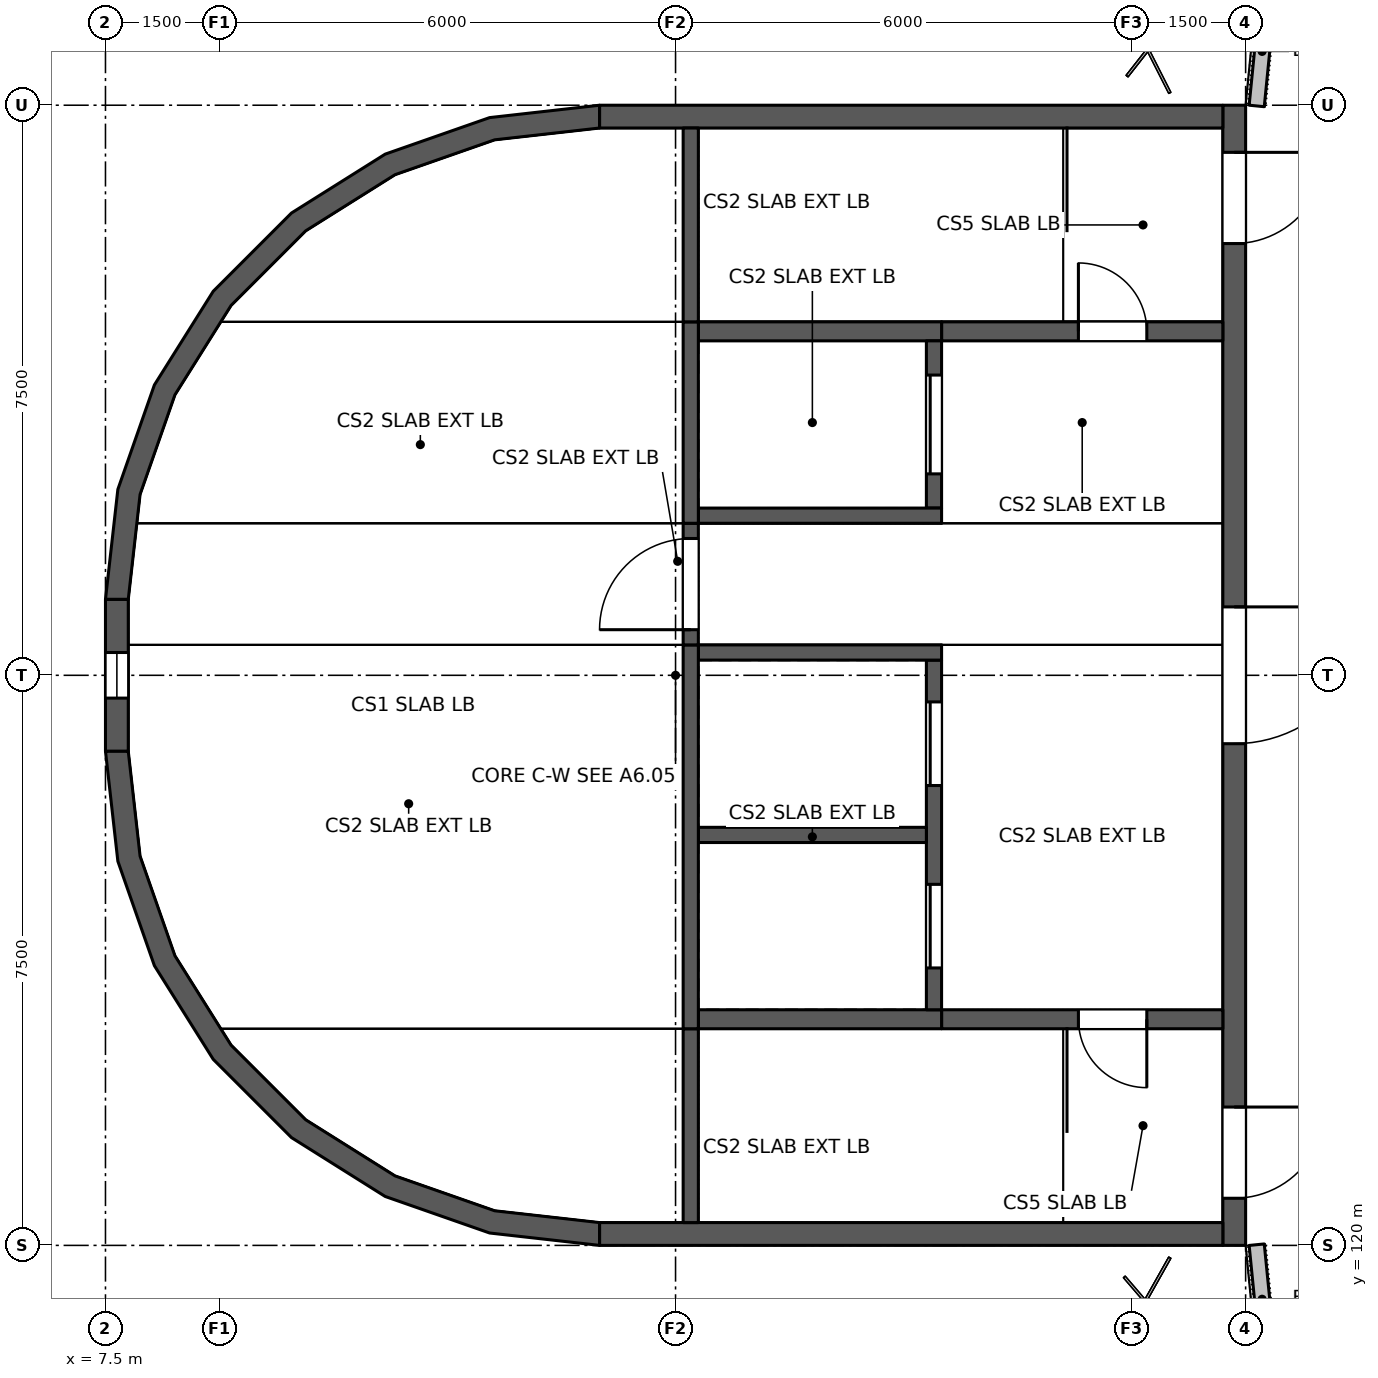
"""IFC4 building model, lengths in metres.
Left out: names, types, materials, properties, quantities, classifications, styles, units other than length and angle.
Written with IfcOpenShell. Run it as: python <this file> out.ifc"""

import sys

from ifc_helpers import new_model, si_unit, direction, frame, frame_2d, origin, place, context, subcontext, project, spatial, polyline, rectangle, outline, extrude, element, fill, save


model = new_model("IFC4")
c1 = context("Model", 3, precision=1e-05, world=origin(), true_north=direction((0.0, 1.0)))
c2 = subcontext(c1, "Body", "Model", "MODEL_VIEW")
j1 = project(units=[si_unit("LENGTHUNIT", "METRE"), si_unit("PLANEANGLEUNIT", "RADIAN")], contexts=[c1])
p1 = place(None, origin())
s1 = spatial("IfcSite", under=j1, at=p1, CompositionType="ELEMENT")
p2 = place(p1, origin())
s2 = spatial("IfcBuilding", under=s1, at=p2, CompositionType="ELEMENT")
p3 = place(p2, frame((0.0, 0.0, 13.2)))
s3 = spatial("IfcBuildingStorey", under=s2, at=p3, CompositionType="ELEMENT", Elevation=13.2)
p4 = place(p3, frame((22.788, 136.426, 0.0), z_axis=(0.0, 0.0, 1.0), x_axis=(-0.098665870876, -0.995120618782, 0.0)))
e1 = element("IfcWall", 1, at=p4, inside=s3, PredefinedType="SOLIDWALL", context=c2, shape_type="SweptSolid", body=[
    extrude(rectangle(XDim=1.443, YDim=0.2, at=frame_2d((0.721, 0.0))), origin(), (0.0, 0.0, 1.0), 1.2),
])
p5 = place(p3, frame((22.646, 120.009, 0.0), z_axis=(0.0, 0.0, 1.0), x_axis=(0.098649257102, -0.995122265892, 0.0)))
e2 = element("IfcWall", 2, at=p5, inside=s3, PredefinedType="SOLIDWALL", context=c2, shape_type="SweptSolid", body=[
    extrude(rectangle(XDim=1.443, YDim=0.2, at=frame_2d((0.721, 0.0))), origin(), (0.0, 0.0, 1.0), 1.2),
])
p6 = place(p3, frame((22.35, 135.0, 0.0), z_axis=(0.0, 0.0, 1.0), x_axis=(0.0, -1.0, 0.0)))
e3 = element("IfcWall", 3, at=p6, inside=s3, PredefinedType="SHEAR", context=c2, shape_type="SweptSolid", body=[
    extrude(rectangle(XDim=15.0, YDim=0.3, at=frame_2d((7.5, 0.0))), origin(), (0.0, 0.0, 1.0), 3.3),
])
p7 = place(p6, frame((13.18, 0.0, 0.0)))
e4 = element("IfcOpeningElement", 4, at=p7, cuts=e3, PredefinedType="OPENING", context=c2, shape_type="SweptSolid", body=[
    extrude(rectangle(XDim=1.2, YDim=2.1, at=frame_2d((0.6, 1.05))), frame((0.0, 0.16, 0.0), z_axis=(0.0, -1.0, 0.0), x_axis=(1.0, 0.0, 0.0)), (0.0, 0.0, 1.0), 0.32),
])
p8 = place(p6, frame((0.62, 0.0, 0.0)))
e5 = element("IfcOpeningElement", 5, at=p8, cuts=e3, PredefinedType="OPENING", context=c2, shape_type="SweptSolid", body=[
    extrude(rectangle(XDim=1.2, YDim=2.1, at=frame_2d((0.6, 1.05))), frame((0.0, 0.16, 0.0), z_axis=(0.0, -1.0, 0.0), x_axis=(1.0, 0.0, 0.0)), (0.0, 0.0, 1.0), 0.32),
])
p9 = place(p6, frame((6.6, 0.0, 0.0)))
e6 = element("IfcOpeningElement", 6, at=p9, cuts=e3, PredefinedType="OPENING", context=c2, shape_type="SweptSolid", body=[
    extrude(rectangle(XDim=1.8, YDim=2.1, at=frame_2d((0.9, 1.05))), frame((0.0, 0.16, 0.0), z_axis=(0.0, -1.0, 0.0), x_axis=(1.0, 0.0, 0.0)), (0.0, 0.0, 1.0), 0.32),
])
p10 = place(p3, frame((7.65, 126.5, 0.0), z_axis=(0.0, 0.0, 1.0), x_axis=(0.0, 1.0, 0.0)))
e7 = element("IfcWall", 7, at=p10, inside=s3, PredefinedType="SHEAR", context=c2, shape_type="SweptSolid", body=[
    extrude(rectangle(XDim=2.0, YDim=0.3, at=frame_2d((1.0, 0.0))), origin(), (0.0, 0.0, 1.0), 4.5),
])
p11 = place(p10, frame((0.7, 0.0, 0.3)))
e8 = element("IfcOpeningElement", 8, at=p11, cuts=e7, PredefinedType="OPENING", context=c2, shape_type="SweptSolid", body=[
    extrude(rectangle(XDim=0.6, YDim=2.7, at=frame_2d((0.3, 1.35))), frame((0.0, 0.16, 0.0), z_axis=(0.0, -1.0, 0.0), x_axis=(1.0, 0.0, 0.0)), (0.0, 0.0, 1.0), 0.32),
])
p12 = place(p3, frame((22.2, 120.15, 0.0), z_axis=(0.0, 0.0, 1.0), x_axis=(-1.0, 0.0, 0.0)))
e9 = element("IfcWall", 9, at=p12, inside=s3, PredefinedType="SHEAR", context=c2, shape_type="SweptSolid", body=[
    extrude(outline(polyline([(0.0, 0.0), (8.2, 0.0), (8.2, 3.983), (0.0, 3.3), (0.0, 0.0)])), frame((0.0, 0.15, 0.0), z_axis=(0.0, -1.0, 0.0), x_axis=(1.0, 0.0, 0.0)), (0.0, 0.0, 1.0), 0.3),
])
p13 = place(p3, frame((14.0, 134.85, 0.0), z_axis=(0.0, 0.0, 1.0), x_axis=(1.0, 0.0, 0.0)))
e10 = element("IfcWall", 10, at=p13, inside=s3, PredefinedType="SHEAR", context=c2, shape_type="SweptSolid", body=[
    extrude(outline(polyline([(0.0, 0.0), (8.2, 0.0), (8.2, 3.3), (0.0, 3.983), (0.0, 0.0)])), frame((0.0, 0.15, 0.0), z_axis=(0.0, -1.0, 0.0), x_axis=(1.0, 0.0, 0.0)), (0.0, 0.0, 1.0), 0.3),
])
p14 = place(p3, frame((22.2, 122.975, 0.0), z_axis=(0.0, 0.0, 1.0), x_axis=(-1.0, 0.0, 0.0)))
e11 = element("IfcWall", 11, at=p14, inside=s3, PredefinedType="STANDARD", context=c2, shape_type="SweptSolid", body=[
    extrude(outline(polyline([(0.0, 0.0), (3.7, 0.0), (3.7, 3.408), (0.0, 3.1), (0.0, 0.0)])), frame((0.0, 0.125, 0.0), z_axis=(0.0, -1.0, 0.0), x_axis=(1.0, 0.0, 0.0)), (0.0, 0.0, 1.0), 0.25),
])
p15 = place(p14, frame((1.0, 0.0, 0.0)))
e12 = element("IfcOpeningElement", 12, at=p15, cuts=e11, PredefinedType="OPENING", context=c2, shape_type="SweptSolid", body=[
    extrude(rectangle(XDim=0.9, YDim=2.1, at=frame_2d((0.45, 1.05))), frame((0.0, 0.135, 0.0), z_axis=(0.0, -1.0, 0.0), x_axis=(1.0, 0.0, 0.0)), (0.0, 0.0, 1.0), 0.27),
])
p16 = place(p3, frame((18.5, 122.975, 0.0), z_axis=(0.0, 0.0, 1.0), x_axis=(-1.0, 0.0, 0.0)))
e13 = element("IfcWall", 13, at=p16, inside=s3, PredefinedType="STANDARD", context=c2, shape_type="SweptSolid", body=[
    extrude(rectangle(XDim=3.2, YDim=0.25, at=frame_2d((1.6, 0.0))), origin(), (0.0, 0.0, 1.0), 4.8),
])
p17 = place(p3, frame((18.5, 132.025, 0.0), z_axis=(0.0, 0.0, 1.0), x_axis=(1.0, 0.0, 0.0)))
e14 = element("IfcWall", 14, at=p17, inside=s3, PredefinedType="STANDARD", context=c2, shape_type="SweptSolid", body=[
    extrude(outline(polyline([(0.0, 0.0), (3.7, 0.0), (3.7, 3.1), (0.0, 3.408), (0.0, 0.0)])), frame((0.0, 0.125, 0.0), z_axis=(0.0, -1.0, 0.0), x_axis=(1.0, 0.0, 0.0)), (0.0, 0.0, 1.0), 0.25),
])
p18 = place(p17, frame((1.8, 0.0, 0.0)))
e15 = element("IfcOpeningElement", 15, at=p18, cuts=e14, PredefinedType="OPENING", context=c2, shape_type="SweptSolid", body=[
    extrude(rectangle(XDim=0.9, YDim=2.1, at=frame_2d((0.45, 1.05))), frame((0.0, 0.135, 0.0), z_axis=(0.0, -1.0, 0.0), x_axis=(1.0, 0.0, 0.0)), (0.0, 0.0, 1.0), 0.27),
])
p19 = place(p3, frame((18.5, 132.025, 0.0), z_axis=(0.0, 0.0, 1.0), x_axis=(-1.0, 0.0, 0.0)))
e16 = element("IfcWall", 16, at=p19, inside=s3, PredefinedType="STANDARD", context=c2, shape_type="SweptSolid", body=[
    extrude(rectangle(XDim=3.2, YDim=0.25, at=frame_2d((1.6, 0.0))), origin(), (0.0, 0.0, 1.0), 7.517),
])
p20 = place(p3, frame((18.4, 123.1, 0.0), z_axis=(0.0, 0.0, 1.0), x_axis=(0.0, 1.0, 0.0)))
e17 = element("IfcWall", 17, at=p20, inside=s3, PredefinedType="STANDARD", context=c2, shape_type="SweptSolid", body=[
    extrude(outline(polyline([(0.0, 0.0), (4.6, 0.0), (4.6, 7.681), (0.0, 4.948), (0.0, 0.0)])), frame((0.0, 0.1, 0.0), z_axis=(0.0, -1.0, 0.0), x_axis=(1.0, 0.0, 0.0)), (0.0, 0.0, 1.0), 0.2),
])
p21 = place(p20, frame((0.55, 0.0, 0.0)))
e18 = element("IfcOpeningElement", 18, at=p21, cuts=e17, PredefinedType="OPENING", context=c2, shape_type="SweptSolid", body=[
    extrude(rectangle(XDim=1.1, YDim=2.1, at=frame_2d((0.55, 1.05))), frame((0.0, 0.11, 0.0), z_axis=(0.0, -1.0, 0.0), x_axis=(1.0, 0.0, 0.0)), (0.0, 0.0, 1.0), 0.22),
])
p22 = place(p20, frame((2.95, 0.0, 0.0)))
e19 = element("IfcOpeningElement", 19, at=p22, cuts=e17, PredefinedType="OPENING", context=c2, shape_type="SweptSolid", body=[
    extrude(rectangle(XDim=1.1, YDim=2.1, at=frame_2d((0.55, 1.05))), frame((0.0, 0.11, 0.0), z_axis=(0.0, -1.0, 0.0), x_axis=(1.0, 0.0, 0.0)), (0.0, 0.0, 1.0), 0.22),
])
p23 = place(p3, frame((18.4, 129.7, 0.0), z_axis=(0.0, 0.0, 1.0), x_axis=(0.0, 1.0, 0.0)))
e20 = element("IfcWall", 20, at=p23, inside=s3, PredefinedType="STANDARD", context=c2, shape_type="SweptSolid", body=[
    extrude(outline(polyline([(0.0, 0.0), (2.2, 0.0), (2.2, 7.517), (0.0, 5.026), (0.0, 0.0)])), frame((0.0, 0.1, 0.0), z_axis=(0.0, -1.0, 0.0), x_axis=(1.0, 0.0, 0.0)), (0.0, 0.0, 1.0), 0.2),
])
p24 = place(p23, frame((0.45, 0.0, 0.0)))
e21 = element("IfcOpeningElement", 21, at=p24, cuts=e20, PredefinedType="OPENING", context=c2, shape_type="SweptSolid", body=[
    extrude(rectangle(XDim=1.3, YDim=2.1, at=frame_2d((0.65, 1.05))), frame((0.0, 0.11, 0.0), z_axis=(0.0, -1.0, 0.0), x_axis=(1.0, 0.0, 0.0)), (0.0, 0.0, 1.0), 0.22),
])
p25 = place(p3, frame((18.3, 125.4, 0.0), z_axis=(0.0, 0.0, 1.0), x_axis=(-1.0, 0.0, 0.0)))
e22 = element("IfcWall", 22, at=p25, inside=s3, PredefinedType="STANDARD", context=c2, shape_type="SweptSolid", body=[
    extrude(rectangle(XDim=3.0, YDim=0.2, at=frame_2d((1.5, 0.0))), origin(), (0.0, 0.0, 1.0), 6.255),
])
p26 = place(p3, frame((18.5, 127.8, 0.0), z_axis=(0.0, 0.0, 1.0), x_axis=(-1.0, 0.0, 0.0)))
e23 = element("IfcWall", 23, at=p26, inside=s3, PredefinedType="STANDARD", context=c2, shape_type="SweptSolid", body=[
    extrude(rectangle(XDim=3.2, YDim=0.2, at=frame_2d((1.6, 0.0))), origin(), (0.0, 0.0, 1.0), 7.681),
])
p27 = place(p3, frame((18.5, 129.6, 0.0), z_axis=(0.0, 0.0, 1.0), x_axis=(-1.0, 0.0, 0.0)))
e24 = element("IfcWall", 24, at=p27, inside=s3, PredefinedType="STANDARD", context=c2, shape_type="SweptSolid", body=[
    extrude(rectangle(XDim=3.2, YDim=0.2, at=frame_2d((1.6, 0.0))), origin(), (0.0, 0.0, 1.0), 4.8),
])
p28 = place(p3, frame((15.2, 120.3, 0.0), z_axis=(0.0, 0.0, 1.0), x_axis=(0.0, 1.0, 0.0)))
e25 = element("IfcWall", 25, at=p28, inside=s3, PredefinedType="STANDARD", context=c2, shape_type="SweptSolid", body=[
    extrude(rectangle(XDim=2.55, YDim=0.2, at=frame_2d((1.275, 0.0))), origin(), (0.0, 0.0, 1.0), 3.683),
])
p29 = place(p3, frame((15.2, 122.85, 0.0), z_axis=(0.0, 0.0, 1.0), x_axis=(0.0, 1.0, 0.0)))
e26 = element("IfcWall", 26, at=p29, inside=s3, PredefinedType="STANDARD", context=c2, shape_type="SweptSolid", body=[
    extrude(outline(polyline([(0.0, 0.0), (5.05, 0.0), (5.05, 7.8), (0.0, 4.8), (0.0, 0.0)])), frame((0.0, 0.1, 0.0), z_axis=(0.0, -1.0, 0.0), x_axis=(1.0, 0.0, 0.0)), (0.0, 0.0, 1.0), 0.2),
])
p30 = place(p3, frame((15.2, 127.9, 0.0), z_axis=(0.0, 0.0, 1.0), x_axis=(0.0, 1.0, 0.0)))
e27 = element("IfcWall", 27, at=p30, inside=s3, PredefinedType="STANDARD", context=c2, shape_type="SweptSolid", body=[
    extrude(rectangle(XDim=1.6, YDim=0.2, at=frame_2d((0.8, 0.0))), origin(), (0.0, 0.0, 1.0), 3.683),
])
p31 = place(p30, frame((0.2, 0.0, 0.0)))
e28 = element("IfcOpeningElement", 28, at=p31, cuts=e27, PredefinedType="OPENING", context=c2, shape_type="SweptSolid", body=[
    extrude(rectangle(XDim=1.2, YDim=2.1, at=frame_2d((0.6, 1.05))), frame((0.0, 0.11, 0.0), z_axis=(0.0, -1.0, 0.0), x_axis=(1.0, 0.0, 0.0)), (0.0, 0.0, 1.0), 0.22),
])
p32 = place(p3, frame((15.2, 129.5, 0.0), z_axis=(0.0, 0.0, 1.0), x_axis=(0.0, 1.0, 0.0)))
e29 = element("IfcWall", 29, at=p32, inside=s3, PredefinedType="STANDARD", context=c2, shape_type="SweptSolid", body=[
    extrude(outline(polyline([(0.0, 0.0), (2.65, 0.0), (2.65, 7.8), (0.0, 4.8), (0.0, 0.0)])), frame((0.0, 0.1, 0.0), z_axis=(0.0, -1.0, 0.0), x_axis=(1.0, 0.0, 0.0)), (0.0, 0.0, 1.0), 0.2),
])
p33 = place(p3, frame((15.2, 132.15, 0.0), z_axis=(0.0, 0.0, 1.0), x_axis=(0.0, 1.0, 0.0)))
e30 = element("IfcWall", 30, at=p33, inside=s3, PredefinedType="STANDARD", context=c2, shape_type="SweptSolid", body=[
    extrude(rectangle(XDim=2.55, YDim=0.2, at=frame_2d((1.275, 0.0))), origin(), (0.0, 0.0, 1.0), 3.683),
])
p34 = place(p3, origin())
e31 = element("IfcWall", 31, at=p34, inside=s3, PredefinedType="SHEAR", context=c2, shape_type="SweptSolid", body=[
    extrude(outline(polyline([(14.0, 120.0), (12.554, 120.163), (11.18, 120.644), (9.947, 121.418), (8.918, 122.447), (8.144, 123.68), (7.663, 125.054), (7.5, 126.5), (7.8, 126.5), (7.955, 125.12), (8.414, 123.81), (9.153, 122.635), (10.135, 121.653), (11.31, 120.914), (12.62, 120.455), (14.0, 120.3), (14.0, 120.0)])), origin(), (0.0, 0.0, 1.0), 4.5),
])
p35 = place(p3, origin())
e32 = element("IfcWall", 32, at=p35, inside=s3, PredefinedType="SHEAR", context=c2, shape_type="SweptSolid", body=[
    extrude(outline(polyline([(14.0, 135.0), (12.554, 134.837), (11.18, 134.356), (9.947, 133.582), (8.918, 132.553), (8.144, 131.32), (7.663, 129.946), (7.5, 128.5), (7.8, 128.5), (7.955, 129.88), (8.414, 131.19), (9.153, 132.365), (10.135, 133.347), (11.31, 134.086), (12.62, 134.545), (14.0, 134.7), (14.0, 135.0)])), origin(), (0.0, 0.0, 1.0), 4.5),
])
p36 = place(p7, origin())
e33 = element("IfcDoor", 33, at=p36, inside=s3, OperationType="SINGLE_SWING_RIGHT", PredefinedType="DOOR", context=c2, shape_type="SweptSolid", body=[
    extrude(rectangle(XDim=1.2, YDim=2.1, at=frame_2d((0.6, 1.05))), frame((0.0, 0.025, 0.0), z_axis=(0.0, -1.0, 0.0), x_axis=(1.0, 0.0, 0.0)), (0.0, 0.0, 1.0), 0.05),
])
fill(e4, e33)
p37 = place(p8, origin())
e34 = element("IfcDoor", 34, at=p37, inside=s3, OperationType="SINGLE_SWING_LEFT", PredefinedType="DOOR", context=c2, shape_type="SweptSolid", body=[
    extrude(rectangle(XDim=1.2, YDim=2.1, at=frame_2d((0.6, 1.05))), frame((0.0, 0.025, 0.0), z_axis=(0.0, -1.0, 0.0), x_axis=(1.0, 0.0, 0.0)), (0.0, 0.0, 1.0), 0.05),
])
fill(e5, e34)
p38 = place(p9, origin())
e35 = element("IfcDoor", 35, at=p38, inside=s3, OperationType="DOUBLE_DOOR_SINGLE_SWING", PredefinedType="DOOR", context=c2, shape_type="SweptSolid", body=[
    extrude(rectangle(XDim=1.8, YDim=2.1, at=frame_2d((0.9, 1.05))), frame((0.0, 0.025, 0.0), z_axis=(0.0, -1.0, 0.0), x_axis=(1.0, 0.0, 0.0)), (0.0, 0.0, 1.0), 0.05),
])
fill(e6, e35)
p39 = place(p15, origin())
e36 = element("IfcDoor", 36, at=p39, inside=s3, OperationType="SINGLE_SWING_LEFT", PredefinedType="DOOR", context=c2, shape_type="SweptSolid", body=[
    extrude(rectangle(XDim=0.9, YDim=2.1, at=frame_2d((0.45, 1.05))), frame((0.0, 0.025, 0.0), z_axis=(0.0, -1.0, 0.0), x_axis=(1.0, 0.0, 0.0)), (0.0, 0.0, 1.0), 0.05),
])
fill(e12, e36)
p40 = place(p18, origin())
e37 = element("IfcDoor", 37, at=p40, inside=s3, OperationType="SINGLE_SWING_RIGHT", PredefinedType="DOOR", context=c2, shape_type="SweptSolid", body=[
    extrude(rectangle(XDim=0.9, YDim=2.1, at=frame_2d((0.45, 1.05))), frame((0.0, 0.025, 0.0), z_axis=(0.0, -1.0, 0.0), x_axis=(1.0, 0.0, 0.0)), (0.0, 0.0, 1.0), 0.05),
])
fill(e15, e37)
p41 = place(p21, origin())
e38 = element("IfcDoor", 38, at=p41, inside=s3, OperationType="DOUBLE_DOOR_SLIDING", PredefinedType="DOOR", context=c2, shape_type="SweptSolid", body=[
    extrude(rectangle(XDim=1.1, YDim=2.1, at=frame_2d((0.55, 1.05))), frame((0.0, 0.025, 0.0), z_axis=(0.0, -1.0, 0.0), x_axis=(1.0, 0.0, 0.0)), (0.0, 0.0, 1.0), 0.05),
])
fill(e18, e38)
p42 = place(p22, origin())
e39 = element("IfcDoor", 39, at=p42, inside=s3, OperationType="DOUBLE_DOOR_SLIDING", PredefinedType="DOOR", context=c2, shape_type="SweptSolid", body=[
    extrude(rectangle(XDim=1.1, YDim=2.1, at=frame_2d((0.55, 1.05))), frame((0.0, 0.025, 0.0), z_axis=(0.0, -1.0, 0.0), x_axis=(1.0, 0.0, 0.0)), (0.0, 0.0, 1.0), 0.05),
])
fill(e19, e39)
p43 = place(p24, origin())
e40 = element("IfcDoor", 40, at=p43, inside=s3, OperationType="DOUBLE_DOOR_SLIDING", PredefinedType="DOOR", context=c2, shape_type="SweptSolid", body=[
    extrude(rectangle(XDim=1.3, YDim=2.1, at=frame_2d((0.65, 1.05))), frame((0.0, 0.025, 0.0), z_axis=(0.0, -1.0, 0.0), x_axis=(1.0, 0.0, 0.0)), (0.0, 0.0, 1.0), 0.05),
])
fill(e21, e40)
p44 = place(p31, origin())
e41 = element("IfcDoor", 41, at=p44, inside=s3, OperationType="SINGLE_SWING_RIGHT", PredefinedType="DOOR", context=c2, shape_type="SweptSolid", body=[
    extrude(rectangle(XDim=1.2, YDim=2.1, at=frame_2d((0.6, 1.05))), frame((0.0, 0.025, 0.0), z_axis=(0.0, -1.0, 0.0), x_axis=(1.0, 0.0, 0.0)), (0.0, 0.0, 1.0), 0.05),
])
fill(e28, e41)
p45 = place(p11, origin())
e42 = element("IfcWindow", 42, at=p45, inside=s3, PartitioningType="SINGLE_PANEL", PredefinedType="WINDOW", context=c2, shape_type="SweptSolid", body=[
    extrude(rectangle(XDim=0.6, YDim=2.7, at=frame_2d((0.3, 1.35))), frame((0.0, 0.03, 0.0), z_axis=(0.0, -1.0, 0.0), x_axis=(1.0, 0.0, 0.0)), (0.0, 0.0, 1.0), 0.06),
])
fill(e8, e42)
save(model, sys.argv[1])
